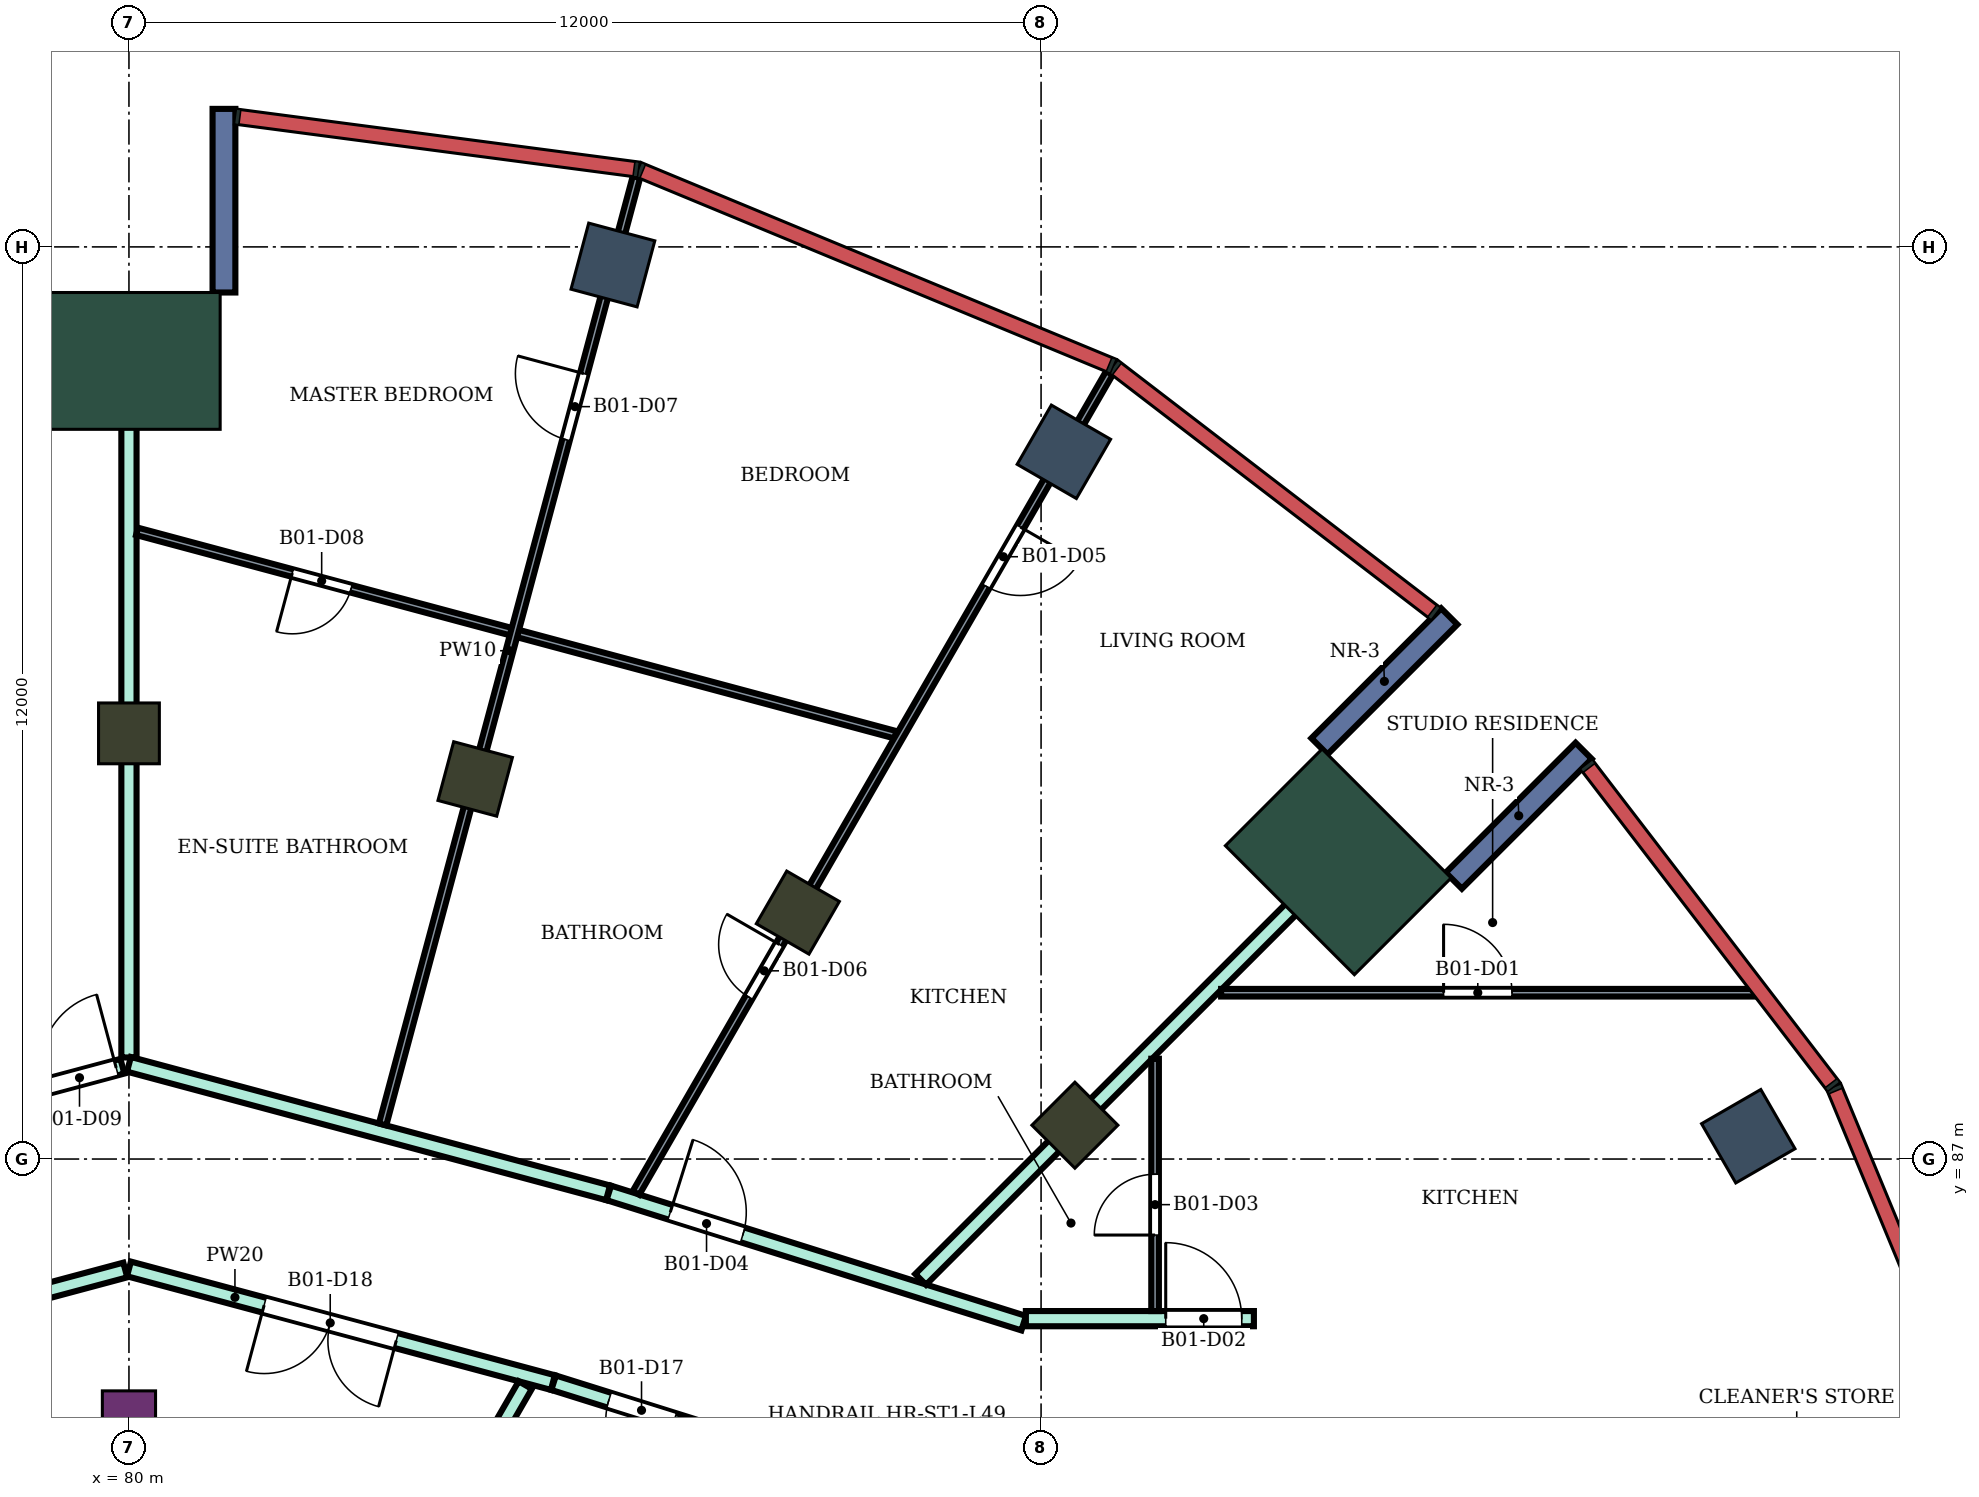
"""IFC4 building model, lengths in metres.
Left out: names, types, materials, properties, quantities, classifications, styles, units other than length and angle.
Written with IfcOpenShell. Run it as: python <this file> out.ifc"""

import sys

from ifc_helpers import new_model, si_unit, direction, frame, frame_2d, origin, origin_2d, place, context, subcontext, project, spatial, rectangle, extrude, element, fill, save


model = new_model("IFC4")
c1 = context("Model", 3, precision=1e-05, world=origin(), true_north=direction((0.0, 1.0)))
c2 = subcontext(c1, "Body", "Model", "MODEL_VIEW")
j1 = project(units=[si_unit("LENGTHUNIT", "METRE"), si_unit("PLANEANGLEUNIT", "RADIAN")], contexts=[c1])
p1 = place(None, origin())
s1 = spatial("IfcSite", under=j1, at=p1, CompositionType="ELEMENT")
p2 = place(p1, origin())
s2 = spatial("IfcBuilding", under=s1, at=p2, CompositionType="ELEMENT")
p3 = place(p2, frame((0.0, 0.0, 212.5)))
s3 = spatial("IfcBuildingStorey", under=s2, at=p3, CompositionType="ELEMENT", Elevation=212.5)
for number, where, z_axis, x_axis in (
    (1, (101.304, 87.3, 0.0), (0.0, 0.0, 1.0), (0.866, 0.5, 0.0)),
    (2, (92.3, 96.304, 0.0), (0.0, 0.0, 1.0), (0.5, 0.866, 0.0)),
    (3, (86.367, 98.762, 0.0), (0.0, 0.0, 1.0), (0.259, 0.966, 0.0)),
):
    element("IfcColumn", number, at=place(p3, frame(where, z_axis=z_axis, x_axis=x_axis)), inside=s3, PredefinedType="COLUMN", context=c2, shape_type="SweptSolid", body=[
        extrude(rectangle(XDim=0.9, YDim=0.9, at=origin_2d()), origin(), (0.0, 0.0, 1.0), 4.2),
    ])
for number, where, z_axis, x_axis in (
    (4, (92.445, 87.445, 0.0), (0.0, 0.0, 1.0), (0.707, 0.707, 0.0)),
    (5, (88.8, 90.242, 0.0), (0.0, 0.0, 1.0), (0.5, 0.866, 0.0)),
    (6, (84.555, 92.0, 0.0), (0.0, 0.0, 1.0), (0.259, 0.966, 0.0)),
    (7, (80.0, 92.6, 0.0), (0.0, 0.0, 1.0), (0.0, 1.0, 0.0)),
):
    element("IfcColumn", number, at=place(p3, frame(where, z_axis=z_axis, x_axis=x_axis)), inside=s3, PredefinedType="COLUMN", context=c2, shape_type="SweptSolid", body=[
        extrude(rectangle(XDim=0.8, YDim=0.8, at=origin_2d()), origin(), (0.0, 0.0, 1.0), 4.2),
    ])
p4 = place(p3, frame((80.0, 83.6, 0.0), z_axis=(0.0, 0.0, 1.0), x_axis=(0.0, 1.0, 0.0)))
e8 = element("IfcColumn", 8, at=p4, inside=s3, PredefinedType="COLUMN", context=c2, shape_type="SweptSolid", body=[
    extrude(rectangle(XDim=0.7, YDim=0.7, at=origin_2d()), origin(), (0.0, 0.0, 1.0), 4.2),
])
for number, where, z_axis, x_axis in (
    (9, (95.91, 90.91, 0.0), (0.0, 0.0, 1.0), (0.707, 0.707, 0.0)),
    (10, (80.0, 97.5, 0.0), (0.0, 0.0, 1.0), (0.0, 1.0, 0.0)),
):
    element("IfcColumn", number, at=place(p3, frame(where, z_axis=z_axis, x_axis=x_axis)), inside=s3, PredefinedType="COLUMN", context=c2, shape_type="SweptSolid", body=[
        extrude(rectangle(XDim=1.8, YDim=2.4, at=origin_2d()), origin(), (0.0, 0.0, 1.0), 4.2),
    ])
for number, where, z_axis, x_axis in (
    (11, (97.43, 90.662, 0.0), (0.0, 0.0, 1.0), (0.707, 0.707, 0.0)),
    (12, (95.662, 92.43, 0.0), (0.0, 0.0, 1.0), (0.707, 0.707, 0.0)),
    (13, (81.25, 98.4, 0.0), (0.0, 0.0, 1.0), (0.0, 1.0, 0.0)),
):
    element("IfcWall", number, at=place(p3, frame(where, z_axis=z_axis, x_axis=x_axis)), inside=s3, PredefinedType="NOTDEFINED", context=c2, shape_type="SweptSolid", body=[
        extrude(rectangle(XDim=2.416, YDim=0.3, at=frame_2d((1.208, 0.0))), origin(), (0.0, 0.0, 1.0), 4.2),
    ])
p5 = place(p3, frame((73.687, 86.555, 0.0), z_axis=(0.0, 0.0, 1.0), x_axis=(0.966020868517, 0.258464081818, 0.0)))
e14 = element("IfcWall", 14, at=p5, inside=s3, PredefinedType="PARTITIONING", context=c2, shape_type="SweptSolid", body=[
    extrude(rectangle(XDim=6.446, YDim=0.2, at=frame_2d((3.223, 0.0))), origin(), (0.0, 0.0, 1.0), 3.75),
])
p6 = place(p5, frame((5.362, 0.0, 0.0)))
e15 = element("IfcOpeningElement", 15, at=p6, cuts=e14, PredefinedType="OPENING", context=c2, shape_type="SweptSolid", body=[
    extrude(rectangle(XDim=1.0, YDim=2.1, at=frame_2d((0.5, 1.05))), frame((0.0, 0.11, 0.0), z_axis=(0.0, -1.0, 0.0), x_axis=(1.0, 0.0, 0.0)), (0.0, 0.0, 1.0), 0.22),
])
p7 = place(p3, frame((74.413, 84.057, 0.0), z_axis=(0.0, 0.0, 1.0), x_axis=(0.965970849692, 0.258650956976, 0.0)))
e16 = element("IfcWall", 16, at=p7, inside=s3, PredefinedType="PARTITIONING", context=c2, shape_type="SweptSolid", body=[
    extrude(rectangle(XDim=5.734, YDim=0.2, at=frame_2d((2.867, 0.0))), origin(), (0.0, 0.0, 1.0), 3.75),
])
p8 = place(p3, frame((80.0, 85.554, 0.0), z_axis=(0.0, 0.0, 1.0), x_axis=(0.965894438951, -0.258936155845, 0.0)))
e17 = element("IfcWall", 17, at=p8, inside=s3, PredefinedType="PARTITIONING", context=c2, shape_type="SweptSolid", body=[
    extrude(rectangle(XDim=5.774, YDim=0.2, at=frame_2d((2.887, 0.0))), origin(), (0.0, 0.0, 1.0), 3.75),
])
p9 = place(p8, frame((1.841, 0.0, 0.0)))
e18 = element("IfcOpeningElement", 18, at=p9, cuts=e17, PredefinedType="OPENING", context=c2, shape_type="SweptSolid", body=[
    extrude(rectangle(XDim=1.8, YDim=2.1, at=frame_2d((0.9, 1.05))), frame((0.0, 0.11, 0.0), z_axis=(0.0, -1.0, 0.0), x_axis=(1.0, 0.0, 0.0)), (0.0, 0.0, 1.0), 0.22),
])
p10 = place(p3, frame((80.0, 88.336, 0.0), z_axis=(0.0, 0.0, 1.0), x_axis=(0.0, 1.0, 0.0)))
e19 = element("IfcWall", 19, at=p10, inside=s3, PredefinedType="PARTITIONING", context=c2, shape_type="SweptSolid", body=[
    extrude(rectangle(XDim=9.864, YDim=0.2, at=frame_2d((4.932, 0.0))), origin(), (0.0, 0.0, 1.0), 3.75),
])
p11 = place(p3, frame((80.0, 88.246, 0.0), z_axis=(0.0, 0.0, 1.0), x_axis=(0.965866355913, -0.25904088966, 0.0)))
e20 = element("IfcWall", 20, at=p11, inside=s3, PredefinedType="PARTITIONING", context=c2, shape_type="SweptSolid", body=[
    extrude(rectangle(XDim=6.526, YDim=0.2, at=frame_2d((3.263, 0.0))), origin(), (0.0, 0.0, 1.0), 3.75),
])
p12 = place(p3, frame((83.852, 81.667, 0.0), z_axis=(0.0, 0.0, 1.0), x_axis=(0.500138740334, 0.865945287196, 0.0)))
e21 = element("IfcWall", 21, at=p12, inside=s3, PredefinedType="PARTITIONING", context=c2, shape_type="SweptSolid", body=[
    extrude(rectangle(XDim=2.724, YDim=0.2, at=frame_2d((1.362, 0.0))), origin(), (0.0, 0.0, 1.0), 3.75),
])
p13 = place(p3, frame((85.587, 84.057, 0.0), z_axis=(0.0, 0.0, 1.0), x_axis=(0.954239513179, -0.299043393987, 0.0)))
e22 = element("IfcWall", 22, at=p13, inside=s3, PredefinedType="PARTITIONING", context=c2, shape_type="SweptSolid", body=[
    extrude(rectangle(XDim=2.424, YDim=0.2, at=frame_2d((1.212, 0.0))), origin(), (0.0, 0.0, 1.0), 3.75),
])
p14 = place(p13, frame((0.762, 0.0, 0.0)))
e23 = element("IfcOpeningElement", 23, at=p14, cuts=e22, PredefinedType="OPENING", context=c2, shape_type="SweptSolid", body=[
    extrude(rectangle(XDim=0.9, YDim=2.1, at=frame_2d((0.45, 1.05))), frame((0.0, 0.11, 0.0), z_axis=(0.0, -1.0, 0.0), x_axis=(1.0, 0.0, 0.0)), (0.0, 0.0, 1.0), 0.22),
])
p15 = place(p3, frame((86.313, 86.554, 0.0), z_axis=(0.0, 0.0, 1.0), x_axis=(0.954081217458, -0.299548043717, 0.0)))
e24 = element("IfcWall", 24, at=p15, inside=s3, PredefinedType="PARTITIONING", context=c2, shape_type="SweptSolid", body=[
    extrude(rectangle(XDim=5.721, YDim=0.2, at=frame_2d((2.86, 0.0))), origin(), (0.0, 0.0, 1.0), 3.75),
])
p16 = place(p15, frame((0.848, 0.0, 0.0)))
e25 = element("IfcOpeningElement", 25, at=p16, cuts=e24, PredefinedType="OPENING", context=c2, shape_type="SweptSolid", body=[
    extrude(rectangle(XDim=1.0, YDim=2.1, at=frame_2d((0.5, 1.05))), frame((0.0, 0.11, 0.0), z_axis=(0.0, -1.0, 0.0), x_axis=(1.0, 0.0, 0.0)), (0.0, 0.0, 1.0), 0.22),
])
p17 = place(p3, frame((90.416, 85.417, 0.0), z_axis=(0.0, 0.0, 1.0), x_axis=(0.707265304299, 0.706948222527, 0.0)))
e26 = element("IfcWall", 26, at=p17, inside=s3, PredefinedType="PARTITIONING", context=c2, shape_type="SweptSolid", body=[
    extrude(rectangle(XDim=8.469, YDim=0.2, at=frame_2d((4.235, 0.0))), origin(), (0.0, 0.0, 1.0), 3.75),
])
p18 = place(p3, frame((91.8, 84.9, 0.0), z_axis=(0.0, 0.0, 1.0), x_axis=(1.0, 0.0, 0.0)))
e27 = element("IfcWall", 27, at=p18, inside=s3, PredefinedType="PARTITIONING", context=c2, shape_type="SweptSolid", body=[
    extrude(rectangle(XDim=3.0, YDim=0.2, at=frame_2d((1.5, 0.0))), origin(), (0.0, 0.0, 1.0), 3.75),
])
p19 = place(p18, frame((1.84, 0.0, 0.0)))
e28 = element("IfcOpeningElement", 28, at=p19, cuts=e27, PredefinedType="OPENING", context=c2, shape_type="SweptSolid", body=[
    extrude(rectangle(XDim=1.0, YDim=2.1, at=frame_2d((0.5, 1.05))), frame((0.0, 0.11, 0.0), z_axis=(0.0, -1.0, 0.0), x_axis=(1.0, 0.0, 0.0)), (0.0, 0.0, 1.0), 0.22),
])
p20 = place(p3, frame((80.106, 95.258, 0.0), z_axis=(0.0, 0.0, 1.0), x_axis=(0.965862886122, -0.259053826862, 0.0)))
e29 = element("IfcWall", 29, at=p20, inside=s3, PredefinedType="PARTITIONING", context=c2, shape_type="SweptSolid", body=[
    extrude(rectangle(XDim=10.331, YDim=0.1, at=frame_2d((5.166, 0.0))), origin(), (0.0, 0.0, 1.0), 3.75),
])
p21 = place(p20, frame((2.115, 0.0, 0.0)))
e30 = element("IfcOpeningElement", 30, at=p21, cuts=e29, PredefinedType="OPENING", context=c2, shape_type="SweptSolid", body=[
    extrude(rectangle(XDim=0.8, YDim=2.1, at=frame_2d((0.4, 1.05))), frame((0.0, 0.06, 0.0), z_axis=(0.0, -1.0, 0.0), x_axis=(1.0, 0.0, 0.0)), (0.0, 0.0, 1.0), 0.12),
])
p22 = place(p3, frame((83.337, 87.455, 0.0), z_axis=(0.0, 0.0, 1.0), x_axis=(0.258843579905, 0.965919251875, 0.0)))
e31 = element("IfcWall", 31, at=p22, inside=s3, PredefinedType="PARTITIONING", context=c2, shape_type="SweptSolid", body=[
    extrude(rectangle(XDim=12.904, YDim=0.1, at=frame_2d((6.452, 0.0))), origin(), (0.0, 0.0, 1.0), 3.75),
])
p23 = place(p22, frame((9.326, 0.0, 0.0)))
e32 = element("IfcOpeningElement", 32, at=p23, cuts=e31, PredefinedType="OPENING", context=c2, shape_type="SweptSolid", body=[
    extrude(rectangle(XDim=0.9, YDim=2.1, at=frame_2d((0.45, 1.05))), frame((0.0, 0.06, 0.0), z_axis=(0.0, -1.0, 0.0), x_axis=(1.0, 0.0, 0.0)), (0.0, 0.0, 1.0), 0.12),
])
p24 = place(p3, frame((86.671, 86.554, 0.0), z_axis=(0.0, 0.0, 1.0), x_axis=(0.50001992892, 0.866013897511, 0.0)))
e33 = element("IfcWall", 33, at=p24, inside=s3, PredefinedType="PARTITIONING", context=c2, shape_type="SweptSolid", body=[
    extrude(rectangle(XDim=12.456, YDim=0.1, at=frame_2d((6.228, 0.0))), origin(), (0.0, 0.0, 1.0), 3.75),
])
p25 = place(p24, frame((9.215, 0.0, 0.0)))
e34 = element("IfcOpeningElement", 34, at=p25, cuts=e33, PredefinedType="OPENING", context=c2, shape_type="SweptSolid", body=[
    extrude(rectangle(XDim=0.9, YDim=2.1, at=frame_2d((0.45, 1.05))), frame((0.0, 0.06, 0.0), z_axis=(0.0, -1.0, 0.0), x_axis=(1.0, 0.0, 0.0)), (0.0, 0.0, 1.0), 0.12),
])
p26 = place(p24, frame((2.974, 0.0, 0.0)))
e35 = element("IfcOpeningElement", 35, at=p26, cuts=e33, PredefinedType="OPENING", context=c2, shape_type="SweptSolid", body=[
    extrude(rectangle(XDim=0.8, YDim=2.1, at=frame_2d((0.4, 1.05))), frame((0.0, 0.06, 0.0), z_axis=(0.0, -1.0, 0.0), x_axis=(1.0, 0.0, 0.0)), (0.0, 0.0, 1.0), 0.12),
])
p27 = place(p3, frame((93.5, 85.0, 0.0), z_axis=(0.0, 0.0, 1.0), x_axis=(0.0, 1.0, 0.0)))
e36 = element("IfcWall", 36, at=p27, inside=s3, PredefinedType="PARTITIONING", context=c2, shape_type="SweptSolid", body=[
    extrude(rectangle(XDim=3.319, YDim=0.1, at=frame_2d((1.66, 0.0))), origin(), (0.0, 0.0, 1.0), 3.75),
])
p28 = place(p27, frame((1.0, 0.0, 0.0)))
e37 = element("IfcOpeningElement", 37, at=p28, cuts=e36, PredefinedType="OPENING", context=c2, shape_type="SweptSolid", body=[
    extrude(rectangle(XDim=0.8, YDim=2.1, at=frame_2d((0.4, 1.05))), frame((0.0, 0.06, 0.0), z_axis=(0.0, -1.0, 0.0), x_axis=(1.0, 0.0, 0.0)), (0.0, 0.0, 1.0), 0.12),
])
p29 = place(p3, frame((94.369, 89.188, 0.0), z_axis=(0.0, 0.0, 1.0), x_axis=(1.0, 0.0, 0.0)))
e38 = element("IfcWall", 38, at=p29, inside=s3, PredefinedType="PARTITIONING", context=c2, shape_type="SweptSolid", body=[
    extrude(rectangle(XDim=7.031, YDim=0.1, at=frame_2d((3.516, 0.0))), origin(), (0.0, 0.0, 1.0), 3.75),
])
p30 = place(p29, frame((2.927, 0.0, 0.0)))
e39 = element("IfcOpeningElement", 39, at=p30, cuts=e38, PredefinedType="OPENING", context=c2, shape_type="SweptSolid", body=[
    extrude(rectangle(XDim=0.9, YDim=2.1, at=frame_2d((0.45, 1.05))), frame((0.0, 0.06, 0.0), z_axis=(0.0, -1.0, 0.0), x_axis=(1.0, 0.0, 0.0)), (0.0, 0.0, 1.0), 0.12),
])
p31 = place(p30, origin())
e40 = element("IfcDoor", 40, at=p31, inside=s3, OperationType="SINGLE_SWING_LEFT", PredefinedType="DOOR", context=c2, shape_type="SweptSolid", body=[
    extrude(rectangle(XDim=0.9, YDim=2.1, at=frame_2d((0.45, 1.05))), frame((0.0, 0.025, 0.0), z_axis=(0.0, -1.0, 0.0), x_axis=(1.0, 0.0, 0.0)), (0.0, 0.0, 1.0), 0.05),
])
fill(e39, e40)
p32 = place(p19, origin())
e41 = element("IfcDoor", 41, at=p32, inside=s3, OperationType="SINGLE_SWING_LEFT", PredefinedType="DOOR", context=c2, shape_type="SweptSolid", body=[
    extrude(rectangle(XDim=1.0, YDim=2.1, at=frame_2d((0.5, 1.05))), frame((0.0, 0.025, 0.0), z_axis=(0.0, -1.0, 0.0), x_axis=(1.0, 0.0, 0.0)), (0.0, 0.0, 1.0), 0.05),
])
fill(e28, e41)
p33 = place(p28, origin())
e42 = element("IfcDoor", 42, at=p33, inside=s3, OperationType="SINGLE_SWING_LEFT", PredefinedType="DOOR", context=c2, shape_type="SweptSolid", body=[
    extrude(rectangle(XDim=0.8, YDim=2.1, at=frame_2d((0.4, 1.05))), frame((0.0, 0.025, 0.0), z_axis=(0.0, -1.0, 0.0), x_axis=(1.0, 0.0, 0.0)), (0.0, 0.0, 1.0), 0.05),
])
fill(e37, e42)
p34 = place(p16, origin())
e43 = element("IfcDoor", 43, at=p34, inside=s3, OperationType="SINGLE_SWING_LEFT", PredefinedType="DOOR", context=c2, shape_type="SweptSolid", body=[
    extrude(rectangle(XDim=1.0, YDim=2.1, at=frame_2d((0.5, 1.05))), frame((0.0, 0.025, 0.0), z_axis=(0.0, -1.0, 0.0), x_axis=(1.0, 0.0, 0.0)), (0.0, 0.0, 1.0), 0.05),
])
fill(e25, e43)
p35 = place(p25, frame((0.9, 0.0, 0.0), z_axis=(0.0, 0.0, 1.0), x_axis=(-1.0, 0.0, 0.0)))
e44 = element("IfcDoor", 44, at=p35, inside=s3, OperationType="SINGLE_SWING_LEFT", PredefinedType="DOOR", context=c2, shape_type="SweptSolid", body=[
    extrude(rectangle(XDim=0.9, YDim=2.1, at=frame_2d((0.45, 1.05))), frame((0.0, 0.025, 0.0), z_axis=(0.0, -1.0, 0.0), x_axis=(1.0, 0.0, 0.0)), (0.0, 0.0, 1.0), 0.05),
])
fill(e34, e44)
p36 = place(p26, origin())
e45 = element("IfcDoor", 45, at=p36, inside=s3, OperationType="SINGLE_SWING_RIGHT", PredefinedType="DOOR", context=c2, shape_type="SweptSolid", body=[
    extrude(rectangle(XDim=0.8, YDim=2.1, at=frame_2d((0.4, 1.05))), frame((0.0, 0.025, 0.0), z_axis=(0.0, -1.0, 0.0), x_axis=(1.0, 0.0, 0.0)), (0.0, 0.0, 1.0), 0.05),
])
fill(e35, e45)
p37 = place(p23, origin())
e46 = element("IfcDoor", 46, at=p37, inside=s3, OperationType="SINGLE_SWING_RIGHT", PredefinedType="DOOR", context=c2, shape_type="SweptSolid", body=[
    extrude(rectangle(XDim=0.9, YDim=2.1, at=frame_2d((0.45, 1.05))), frame((0.0, 0.025, 0.0), z_axis=(0.0, -1.0, 0.0), x_axis=(1.0, 0.0, 0.0)), (0.0, 0.0, 1.0), 0.05),
])
fill(e32, e46)
p38 = place(p21, frame((0.8, 0.0, 0.0), z_axis=(0.0, 0.0, 1.0), x_axis=(-1.0, 0.0, 0.0)))
e47 = element("IfcDoor", 47, at=p38, inside=s3, OperationType="SINGLE_SWING_RIGHT", PredefinedType="DOOR", context=c2, shape_type="SweptSolid", body=[
    extrude(rectangle(XDim=0.8, YDim=2.1, at=frame_2d((0.4, 1.05))), frame((0.0, 0.025, 0.0), z_axis=(0.0, -1.0, 0.0), x_axis=(1.0, 0.0, 0.0)), (0.0, 0.0, 1.0), 0.05),
])
fill(e30, e47)
p39 = place(p6, origin())
e48 = element("IfcDoor", 48, at=p39, inside=s3, OperationType="SINGLE_SWING_RIGHT", PredefinedType="DOOR", context=c2, shape_type="SweptSolid", body=[
    extrude(rectangle(XDim=1.0, YDim=2.1, at=frame_2d((0.5, 1.05))), frame((0.0, 0.025, 0.0), z_axis=(0.0, -1.0, 0.0), x_axis=(1.0, 0.0, 0.0)), (0.0, 0.0, 1.0), 0.05),
])
fill(e15, e48)
p40 = place(p14, frame((0.9, 0.0, 0.0), z_axis=(0.0, 0.0, 1.0), x_axis=(-1.0, 0.0, 0.0)))
e49 = element("IfcDoor", 49, at=p40, inside=s3, OperationType="SINGLE_SWING_LEFT", PredefinedType="DOOR", context=c2, shape_type="SweptSolid", body=[
    extrude(rectangle(XDim=0.9, YDim=2.1, at=frame_2d((0.45, 1.05))), frame((0.0, 0.025, 0.0), z_axis=(0.0, -1.0, 0.0), x_axis=(1.0, 0.0, 0.0)), (0.0, 0.0, 1.0), 0.05),
])
fill(e23, e49)
p41 = place(p9, frame((1.8, 0.0, 0.0), z_axis=(0.0, 0.0, 1.0), x_axis=(-1.0, 0.0, 0.0)))
e50 = element("IfcDoor", 50, at=p41, inside=s3, OperationType="DOUBLE_DOOR_SINGLE_SWING", PredefinedType="DOOR", context=c2, shape_type="SweptSolid", body=[
    extrude(rectangle(XDim=1.8, YDim=2.1, at=frame_2d((0.9, 1.05))), frame((0.0, 0.025, 0.0), z_axis=(0.0, -1.0, 0.0), x_axis=(1.0, 0.0, 0.0)), (0.0, 0.0, 1.0), 0.05),
])
fill(e18, e50)
save(model, sys.argv[1])
